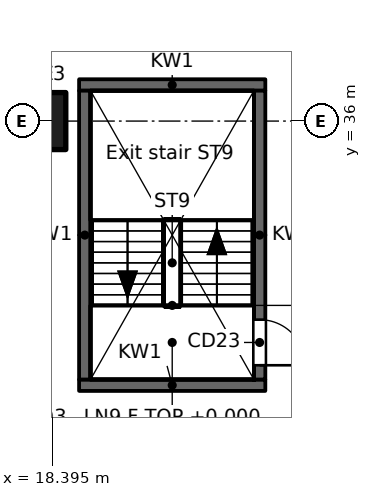
"""IFC4 building model, lengths in metres.
Left out: names, types, materials, properties, quantities, classifications, styles, units other than length and angle.
Written with IfcOpenShell. Run it as: python <this file> out.ifc"""

import sys

from ifc_helpers import new_model, si_unit, direction, frame, frame_2d, origin, origin_2d, place, context, subcontext, project, spatial, rectangle, extrude, element, fill, save


model = new_model("IFC4")
c1 = context("Model", 3, precision=1e-05, world=origin(), true_north=direction((0.0, 1.0)))
c2 = subcontext(c1, "Body", "Model", "MODEL_VIEW")
j1 = project(units=[si_unit("LENGTHUNIT", "METRE"), si_unit("PLANEANGLEUNIT", "RADIAN")], contexts=[c1])
p1 = place(None, origin())
s1 = spatial("IfcSite", under=j1, at=p1, CompositionType="ELEMENT")
p2 = place(p1, origin())
s2 = spatial("IfcBuilding", under=s1, at=p2, CompositionType="ELEMENT")
p3 = place(p2, origin())
s3 = spatial("IfcBuildingStorey", under=s2, at=p3, CompositionType="ELEMENT", Elevation=0.0)
p4 = place(p3, frame((18.0, 36.0, 0.0), z_axis=(0.0, 0.0, 1.0), x_axis=(1.0, 0.0, 0.0)))
e1 = element("IfcColumn", 1, at=p4, inside=s3, PredefinedType="COLUMN", context=c2, shape_type="SweptSolid", body=[
    extrude(rectangle(XDim=1.5, YDim=1.5, at=origin_2d()), origin(), (0.0, 0.0, 1.0), 6.0),
])
for number, where, z_axis, x_axis in (
    (2, (19.1, 29.05, -0.4), (0.0, 0.0, 1.0), (1.0, 0.0, 0.0)),
    (3, (19.1, 36.95, -0.4), (0.0, 0.0, 1.0), (1.0, 0.0, 0.0)),
):
    element("IfcWall", number, at=place(p3, frame(where, z_axis=z_axis, x_axis=x_axis)), inside=s3, PredefinedType="SOLIDWALL", context=c2, shape_type="SweptSolid", body=[
        extrude(rectangle(XDim=4.9, YDim=0.3, at=frame_2d((2.45, 0.0))), origin(), (0.0, 0.0, 1.0), 6.05),
    ])
p5 = place(p3, frame((19.25, 29.2, -0.4), z_axis=(0.0, 0.0, 1.0), x_axis=(0.0, 1.0, 0.0)))
e4 = element("IfcWall", 4, at=p5, inside=s3, PredefinedType="SOLIDWALL", context=c2, shape_type="SweptSolid", body=[
    extrude(rectangle(XDim=7.6, YDim=0.3, at=frame_2d((3.8, 0.0))), origin(), (0.0, 0.0, 1.0), 6.05),
])
p6 = place(p3, frame((23.85, 29.2, -0.4), z_axis=(0.0, 0.0, 1.0), x_axis=(0.0, 1.0, 0.0)))
e5 = element("IfcWall", 5, at=p6, inside=s3, PredefinedType="SOLIDWALL", context=c2, shape_type="SweptSolid", body=[
    extrude(rectangle(XDim=7.6, YDim=0.3, at=frame_2d((3.8, 0.0))), origin(), (0.0, 0.0, 1.0), 6.05),
])
p7 = place(p6, frame((0.375, 0.0, 0.4)))
e6 = element("IfcOpeningElement", 6, at=p7, cuts=e5, PredefinedType="OPENING", context=c2, shape_type="SweptSolid", body=[
    extrude(rectangle(XDim=1.2, YDim=2.1, at=frame_2d((0.6, 1.05))), frame((0.0, 0.15, 0.0), z_axis=(0.0, -1.0, 0.0), x_axis=(1.0, 0.0, 0.0)), (0.0, 0.0, 1.0), 0.3),
])
p8 = place(p7, frame((1.2, 0.0, 0.0), z_axis=(0.0, 0.0, 1.0), x_axis=(-1.0, 0.0, 0.0)))
e7 = element("IfcDoor", 7, at=p8, inside=s3, OperationType="SINGLE_SWING_RIGHT", PredefinedType="DOOR", context=c2, shape_type="SweptSolid", body=[
    extrude(rectangle(XDim=1.2, YDim=2.1, at=frame_2d((0.6, 1.05))), frame((0.0, 0.025, 0.0), z_axis=(0.0, -1.0, 0.0), x_axis=(1.0, 0.0, 0.0)), (0.0, 0.0, 1.0), 0.05),
])
fill(e6, e7)
save(model, sys.argv[1])
